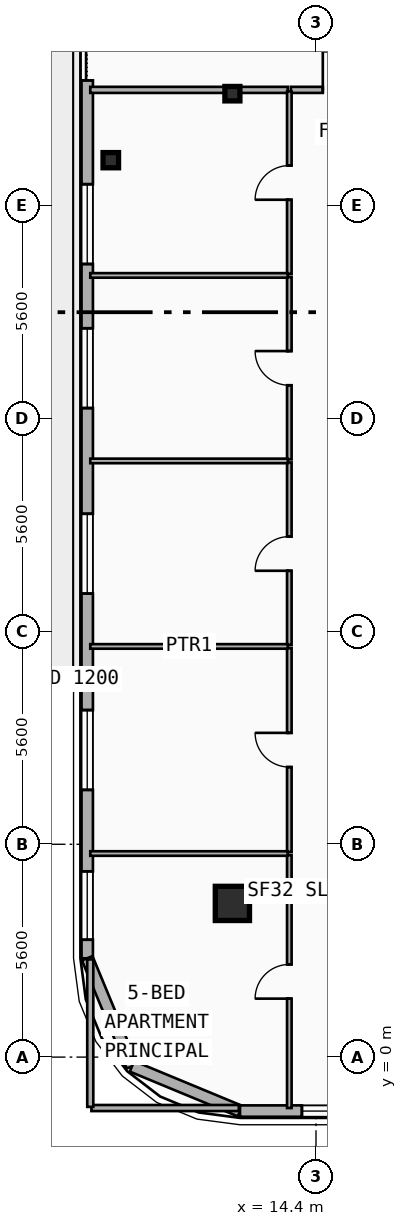
"""IFC4 building model, lengths in metres.
Left out: names, types, materials, properties, quantities, classifications, styles, units other than length and angle.
Written with IfcOpenShell. Run it as: python <this file> out.ifc"""

import sys

from ifc_helpers import new_model, si_unit, direction, frame, frame_2d, origin, origin_2d, place, context, subcontext, project, spatial, rectangle, i_section, extrude, element, fill, save


model = new_model("IFC4")
c1 = context("Model", 3, precision=1e-05, world=origin(), true_north=direction((0.0, 1.0)))
c2 = subcontext(c1, "Body", "Model", "MODEL_VIEW")
j1 = project(units=[si_unit("LENGTHUNIT", "METRE"), si_unit("PLANEANGLEUNIT", "RADIAN")], contexts=[c1])
p1 = place(None, origin())
s1 = spatial("IfcSite", under=j1, at=p1, CompositionType="ELEMENT")
p2 = place(p1, origin())
s2 = spatial("IfcBuilding", under=s1, at=p2, CompositionType="ELEMENT")
p3 = place(p2, frame((0.0, 0.0, 243.6)))
s3 = spatial("IfcBuildingStorey", under=s2, at=p3, CompositionType="ELEMENT", Elevation=243.6)
p4 = place(p3, frame((12.2, 25.35, 0.0), z_axis=(0.0, 0.0, 1.0), x_axis=(1.0, 0.0, 0.0)))
e1 = element("IfcColumn", 1, at=p4, inside=s3, PredefinedType="COLUMN", context=c2, shape_type="SweptSolid", body=[
    extrude(i_section(OverallWidth=0.395, OverallDepth=0.38, WebThickness=0.019, FlangeThickness=0.03, FilletRadius=0.015, at=origin_2d()), origin(), (0.0, 0.0, 1.0), 3.7),
])
p5 = place(p3, frame((12.2, 4.153, 0.0), z_axis=(0.0, -0.090227632116, 0.995921168769), x_axis=(1.0, 0.0, 0.0)))
e2 = element("IfcColumn", 2, at=p5, inside=s3, PredefinedType="COLUMN", context=c2, shape_type="SweptSolid", body=[
    extrude(rectangle(XDim=0.9, YDim=0.9, at=origin_2d()), origin(), (0.0, 0.0, 1.0), 3.715),
])
p6 = place(p3, frame((9.0, 23.6, 0.0), z_axis=(0.0, 0.0, 1.0), x_axis=(1.0, 0.0, 0.0)))
e3 = element("IfcColumn", 3, at=p6, inside=s3, PredefinedType="COLUMN", context=c2, shape_type="SweptSolid", body=[
    extrude(i_section(OverallWidth=0.408, OverallDepth=0.4, WebThickness=0.025, FlangeThickness=0.039, FilletRadius=0.015, at=origin_2d()), origin(), (0.0, 0.0, 1.0), 3.7),
])
p7 = place(p3, frame((8.38, 2.6, 0.0), z_axis=(0.0, 0.0, 1.0), x_axis=(0.0, 1.0, 0.0)))
e4 = element("IfcWall", 4, at=p7, inside=s3, PredefinedType="SOLIDWALL", context=c2, shape_type="SweptSolid", body=[
    extrude(rectangle(XDim=34.2, YDim=0.3, at=frame_2d((17.1, 0.0))), origin(), (0.0, 0.0, 1.0), 3.42),
])
p8 = place(p7, frame((23.1, 0.0, 0.0)))
e5 = element("IfcOpeningElement", 5, at=p8, cuts=e4, PredefinedType="OPENING", context=c2, shape_type="SweptSolid", body=[
    extrude(rectangle(XDim=1.6, YDim=2.2, at=frame_2d((0.8, 1.1))), frame((0.0, 0.16, 0.0), z_axis=(0.0, -1.0, 0.0), x_axis=(1.0, 0.0, 0.0)), (0.0, 0.0, 1.0), 0.32),
])
p9 = place(p7, frame((0.489, 0.0, 0.8)))
e6 = element("IfcOpeningElement", 6, at=p9, cuts=e4, PredefinedType="OPENING", context=c2, shape_type="SweptSolid", body=[
    extrude(rectangle(XDim=1.8, YDim=1.8, at=frame_2d((0.9, 0.9))), frame((0.0, 0.16, 0.0), z_axis=(0.0, -1.0, 0.0), x_axis=(1.0, 0.0, 0.0)), (0.0, 0.0, 1.0), 0.32),
])
p10 = place(p7, frame((4.431, 0.0, 0.75)))
e7 = element("IfcOpeningElement", 7, at=p10, cuts=e4, PredefinedType="OPENING", context=c2, shape_type="SweptSolid", body=[
    extrude(rectangle(XDim=2.1, YDim=2.1, at=frame_2d((1.05, 1.05))), frame((0.0, 0.16, 0.0), z_axis=(0.0, -1.0, 0.0), x_axis=(1.0, 0.0, 0.0)), (0.0, 0.0, 1.0), 0.32),
])
p11 = place(p7, frame((9.596, 0.0, 0.75)))
e8 = element("IfcOpeningElement", 8, at=p11, cuts=e4, PredefinedType="OPENING", context=c2, shape_type="SweptSolid", body=[
    extrude(rectangle(XDim=2.1, YDim=2.1, at=frame_2d((1.05, 1.05))), frame((0.0, 0.16, 0.0), z_axis=(0.0, -1.0, 0.0), x_axis=(1.0, 0.0, 0.0)), (0.0, 0.0, 1.0), 0.32),
])
p12 = place(p7, frame((14.478, 0.0, 0.75)))
e9 = element("IfcOpeningElement", 9, at=p12, cuts=e4, PredefinedType="OPENING", context=c2, shape_type="SweptSolid", body=[
    extrude(rectangle(XDim=2.1, YDim=2.1, at=frame_2d((1.05, 1.05))), frame((0.0, 0.16, 0.0), z_axis=(0.0, -1.0, 0.0), x_axis=(1.0, 0.0, 0.0)), (0.0, 0.0, 1.0), 0.32),
])
p13 = place(p7, frame((18.268, 0.0, 0.75)))
e10 = element("IfcOpeningElement", 10, at=p13, cuts=e4, PredefinedType="OPENING", context=c2, shape_type="SweptSolid", body=[
    extrude(rectangle(XDim=2.1, YDim=2.1, at=frame_2d((1.05, 1.05))), frame((0.0, 0.16, 0.0), z_axis=(0.0, -1.0, 0.0), x_axis=(1.0, 0.0, 0.0)), (0.0, 0.0, 1.0), 0.32),
])
p14 = place(p3, frame((9.557, -0.243, 0.0), z_axis=(0.0, 0.0, 1.0), x_axis=(-0.382676475685, 0.923882414032, 0.0)))
e11 = element("IfcWall", 11, at=p14, inside=s3, PredefinedType="SOLIDWALL", context=c2, shape_type="SweptSolid", body=[
    extrude(rectangle(XDim=3.077, YDim=0.3, at=frame_2d((1.539, 0.0))), origin(), (0.0, 0.0, 1.0), 3.42),
])
p15 = place(p3, frame((12.4, -1.42, 0.0), z_axis=(0.0, 0.0, 1.0), x_axis=(-0.92389884758, 0.382636798336, 0.0)))
e12 = element("IfcWall", 12, at=p15, inside=s3, PredefinedType="SOLIDWALL", context=c2, shape_type="SweptSolid", body=[
    extrude(rectangle(XDim=3.077, YDim=0.3, at=frame_2d((1.538, 0.0))), origin(), (0.0, 0.0, 1.0), 3.42),
])
p16 = place(p3, frame((45.2, -1.42, 0.0), z_axis=(0.0, 0.0, 1.0), x_axis=(-1.0, 0.0, 0.0)))
e13 = element("IfcWall", 13, at=p16, inside=s3, PredefinedType="SOLIDWALL", context=c2, shape_type="SweptSolid", body=[
    extrude(rectangle(XDim=32.8, YDim=0.3, at=frame_2d((16.4, 0.0))), origin(), (0.0, 0.0, 1.0), 3.42),
])
p17 = place(p16, frame((29.071, 0.0, 0.75)))
e14 = element("IfcOpeningElement", 14, at=p17, cuts=e13, PredefinedType="OPENING", context=c2, shape_type="SweptSolid", body=[
    extrude(rectangle(XDim=2.1, YDim=2.1, at=frame_2d((1.05, 1.05))), frame((0.0, 0.16, 0.0), z_axis=(0.0, -1.0, 0.0), x_axis=(1.0, 0.0, 0.0)), (0.0, 0.0, 1.0), 0.32),
])
p18 = place(p16, frame((26.745, 0.0, 0.75)))
e15 = element("IfcOpeningElement", 15, at=p18, cuts=e13, PredefinedType="OPENING", context=c2, shape_type="SweptSolid", body=[
    extrude(rectangle(XDim=1.6, YDim=1.95, at=frame_2d((0.8, 0.975))), frame((0.0, 0.16, 0.0), z_axis=(0.0, -1.0, 0.0), x_axis=(1.0, 0.0, 0.0)), (0.0, 0.0, 1.0), 0.32),
])
p19 = place(p16, frame((18.105, 0.0, 0.75)))
e16 = element("IfcOpeningElement", 16, at=p19, cuts=e13, PredefinedType="OPENING", context=c2, shape_type="SweptSolid", body=[
    extrude(rectangle(XDim=2.1, YDim=2.1, at=frame_2d((1.05, 1.05))), frame((0.0, 0.16, 0.0), z_axis=(0.0, -1.0, 0.0), x_axis=(1.0, 0.0, 0.0)), (0.0, 0.0, 1.0), 0.32),
])
p20 = place(p16, frame((21.762, 0.0, 0.75)))
e17 = element("IfcOpeningElement", 17, at=p20, cuts=e13, PredefinedType="OPENING", context=c2, shape_type="SweptSolid", body=[
    extrude(rectangle(XDim=2.1, YDim=2.1, at=frame_2d((1.05, 1.05))), frame((0.0, 0.16, 0.0), z_axis=(0.0, -1.0, 0.0), x_axis=(1.0, 0.0, 0.0)), (0.0, 0.0, 1.0), 0.32),
])
p21 = place(p16, frame((11.364, 0.0, 0.75)))
e18 = element("IfcOpeningElement", 18, at=p21, cuts=e13, PredefinedType="OPENING", context=c2, shape_type="SweptSolid", body=[
    extrude(rectangle(XDim=2.1, YDim=2.1, at=frame_2d((1.05, 1.05))), frame((0.0, 0.16, 0.0), z_axis=(0.0, -1.0, 0.0), x_axis=(1.0, 0.0, 0.0)), (0.0, 0.0, 1.0), 0.32),
])
p22 = place(p16, frame((9.238, 0.0, 0.68)))
e19 = element("IfcOpeningElement", 19, at=p22, cuts=e13, PredefinedType="OPENING", context=c2, shape_type="SweptSolid", body=[
    extrude(rectangle(XDim=1.2, YDim=1.5, at=frame_2d((0.6, 0.75))), frame((0.0, 0.16, 0.0), z_axis=(0.0, -1.0, 0.0), x_axis=(1.0, 0.0, 0.0)), (0.0, 0.0, 1.0), 0.32),
])
p23 = place(p16, frame((14.669, 0.0, 0.75)))
e20 = element("IfcOpeningElement", 20, at=p23, cuts=e13, PredefinedType="OPENING", context=c2, shape_type="SweptSolid", body=[
    extrude(rectangle(XDim=2.1, YDim=2.1, at=frame_2d((1.05, 1.05))), frame((0.0, 0.16, 0.0), z_axis=(0.0, -1.0, 0.0), x_axis=(1.0, 0.0, 0.0)), (0.0, 0.0, 1.0), 0.32),
])
p24 = place(p16, frame((1.937, 0.0, 0.75)))
e21 = element("IfcOpeningElement", 21, at=p24, cuts=e13, PredefinedType="OPENING", context=c2, shape_type="SweptSolid", body=[
    extrude(rectangle(XDim=2.1, YDim=2.1, at=frame_2d((1.05, 1.05))), frame((0.0, 0.16, 0.0), z_axis=(0.0, -1.0, 0.0), x_axis=(1.0, 0.0, 0.0)), (0.0, 0.0, 1.0), 0.32),
])
p25 = place(p16, frame((4.709, 0.0, 0.8)))
e22 = element("IfcOpeningElement", 22, at=p25, cuts=e13, PredefinedType="OPENING", context=c2, shape_type="SweptSolid", body=[
    extrude(rectangle(XDim=1.8, YDim=1.8, at=frame_2d((0.9, 0.9))), frame((0.0, 0.16, 0.0), z_axis=(0.0, -1.0, 0.0), x_axis=(1.0, 0.0, 0.0)), (0.0, 0.0, 1.0), 0.32),
])
p26 = place(p3, frame((13.738, 25.45, 0.0), z_axis=(0.0, 0.0, 1.0), x_axis=(1.0, 0.0, 0.0)))
e23 = element("IfcWall", 23, at=p26, inside=s3, PredefinedType="PARTITIONING", context=c2, shape_type="SweptSolid", body=[
    extrude(rectangle(XDim=2.682, YDim=0.16, at=frame_2d((1.341, 0.0))), origin(), (0.0, 0.0, 1.0), 3.42),
])
p27 = place(p26, frame((0.841, 0.0, 0.0)))
e24 = element("IfcOpeningElement", 24, at=p27, cuts=e23, PredefinedType="OPENING", context=c2, shape_type="SweptSolid", body=[
    extrude(rectangle(XDim=1.0, YDim=2.15, at=frame_2d((0.5, 1.075))), frame((0.0, 0.09, 0.0), z_axis=(0.0, -1.0, 0.0), x_axis=(1.0, 0.0, 0.0)), (0.0, 0.0, 1.0), 0.18),
])
p28 = place(p3, frame((8.46, 25.45, 0.0), z_axis=(0.0, 0.0, 1.0), x_axis=(1.0, 0.0, 0.0)))
e25 = element("IfcWall", 25, at=p28, inside=s3, PredefinedType="PARTITIONING", context=c2, shape_type="SweptSolid", body=[
    extrude(rectangle(XDim=5.198, YDim=0.16, at=frame_2d((2.599, 0.0))), origin(), (0.0, 0.0, 1.0), 2.7),
])
p29 = place(p3, frame((13.698, -1.34, 0.0), z_axis=(0.0, 0.0, 1.0), x_axis=(0.0, 1.0, 0.0)))
e26 = element("IfcWall", 26, at=p29, inside=s3, PredefinedType="PARTITIONING", context=c2, shape_type="SweptSolid", body=[
    extrude(rectangle(XDim=6.657, YDim=0.12, at=frame_2d((3.329, 0.0))), origin(), (0.0, 0.0, 1.0), 3.08),
])
p30 = place(p29, frame((2.878, 0.0, 0.0)))
e27 = element("IfcOpeningElement", 27, at=p30, cuts=e26, PredefinedType="OPENING", context=c2, shape_type="SweptSolid", body=[
    extrude(rectangle(XDim=0.9, YDim=2.1, at=frame_2d((0.45, 1.05))), frame((0.0, 0.07, 0.0), z_axis=(0.0, -1.0, 0.0), x_axis=(1.0, 0.0, 0.0)), (0.0, 0.0, 1.0), 0.14),
])
p31 = place(p3, frame((13.698, 5.397, 0.0), z_axis=(0.0, 0.0, 1.0), x_axis=(0.0, 1.0, 0.0)))
e28 = element("IfcWall", 28, at=p31, inside=s3, PredefinedType="PARTITIONING", context=c2, shape_type="SweptSolid", body=[
    extrude(rectangle(XDim=5.369, YDim=0.12, at=frame_2d((2.685, 0.0))), origin(), (0.0, 0.0, 1.0), 3.05),
])
p32 = place(p31, frame((2.235, 0.0, 0.0)))
e29 = element("IfcOpeningElement", 29, at=p32, cuts=e28, PredefinedType="OPENING", context=c2, shape_type="SweptSolid", body=[
    extrude(rectangle(XDim=0.9, YDim=2.1, at=frame_2d((0.45, 1.05))), frame((0.0, 0.07, 0.0), z_axis=(0.0, -1.0, 0.0), x_axis=(1.0, 0.0, 0.0)), (0.0, 0.0, 1.0), 0.14),
])
p33 = place(p3, frame((13.698, 10.846, 0.0), z_axis=(0.0, 0.0, 1.0), x_axis=(0.0, 1.0, 0.0)))
e30 = element("IfcWall", 30, at=p33, inside=s3, PredefinedType="PARTITIONING", context=c2, shape_type="SweptSolid", body=[
    extrude(rectangle(XDim=4.801, YDim=0.12, at=frame_2d((2.4, 0.0))), origin(), (0.0, 0.0, 1.0), 2.9),
])
p34 = place(p33, frame((1.95, 0.0, 0.0)))
e31 = element("IfcOpeningElement", 31, at=p34, cuts=e30, PredefinedType="OPENING", context=c2, shape_type="SweptSolid", body=[
    extrude(rectangle(XDim=0.9, YDim=2.1, at=frame_2d((0.45, 1.05))), frame((0.0, 0.07, 0.0), z_axis=(0.0, -1.0, 0.0), x_axis=(1.0, 0.0, 0.0)), (0.0, 0.0, 1.0), 0.14),
])
p35 = place(p3, frame((13.698, 15.727, 0.0), z_axis=(0.0, 0.0, 1.0), x_axis=(0.0, 1.0, 0.0)))
e32 = element("IfcWall", 32, at=p35, inside=s3, PredefinedType="PARTITIONING", context=c2, shape_type="SweptSolid", body=[
    extrude(rectangle(XDim=4.801, YDim=0.12, at=frame_2d((2.4, 0.0))), origin(), (0.0, 0.0, 1.0), 2.9),
])
p36 = place(p35, frame((1.95, 0.0, 0.0)))
e33 = element("IfcOpeningElement", 33, at=p36, cuts=e32, PredefinedType="OPENING", context=c2, shape_type="SweptSolid", body=[
    extrude(rectangle(XDim=0.9, YDim=2.1, at=frame_2d((0.45, 1.05))), frame((0.0, 0.07, 0.0), z_axis=(0.0, -1.0, 0.0), x_axis=(1.0, 0.0, 0.0)), (0.0, 0.0, 1.0), 0.14),
])
p37 = place(p3, frame((13.698, 20.608, 0.0), z_axis=(0.0, 0.0, 1.0), x_axis=(0.0, 1.0, 0.0)))
e34 = element("IfcWall", 34, at=p37, inside=s3, PredefinedType="PARTITIONING", context=c2, shape_type="SweptSolid", body=[
    extrude(rectangle(XDim=4.802, YDim=0.12, at=frame_2d((2.401, 0.0))), origin(), (0.0, 0.0, 1.0), 3.05),
])
p38 = place(p37, frame((1.951, 0.0, 0.0)))
e35 = element("IfcOpeningElement", 35, at=p38, cuts=e34, PredefinedType="OPENING", context=c2, shape_type="SweptSolid", body=[
    extrude(rectangle(XDim=0.9, YDim=2.1, at=frame_2d((0.45, 1.05))), frame((0.0, 0.07, 0.0), z_axis=(0.0, -1.0, 0.0), x_axis=(1.0, 0.0, 0.0)), (0.0, 0.0, 1.0), 0.14),
])
for number, where, z_axis, x_axis in (
    (36, (8.46, 5.357, 0.0), (0.0, 0.0, 1.0), (1.0, 0.0, 0.0)),
    (37, (8.46, 10.806, 0.0), (0.0, 0.0, 1.0), (1.0, 0.0, 0.0)),
    (38, (8.46, 15.687, 0.0), (0.0, 0.0, 1.0), (1.0, 0.0, 0.0)),
    (39, (8.46, 20.568, 0.0), (0.0, 0.0, 1.0), (1.0, 0.0, 0.0)),
):
    element("IfcWall", number, at=place(p3, frame(where, z_axis=z_axis, x_axis=x_axis)), inside=s3, PredefinedType="PARTITIONING", context=c2, shape_type="SweptSolid", body=[
        extrude(rectangle(XDim=5.198, YDim=0.12, at=frame_2d((2.599, 0.0))), origin(), (0.0, 0.0, 1.0), 2.7),
    ])
for number, where, z_axis, x_axis in (
    (40, (8.49, -1.34, 0.0), (0.0, 0.0, 1.0), (1.0, 0.0, 0.0)),
    (41, (8.46, -1.31, 0.0), (0.0, 0.0, 1.0), (0.0, 1.0, 0.0)),
):
    element("IfcWall", number, at=place(p3, frame(where, z_axis=z_axis, x_axis=x_axis)), inside=s3, PredefinedType="PARTITIONING", context=c2, shape_type="SweptSolid", body=[
        extrude(rectangle(XDim=3.88, YDim=0.16, at=frame_2d((1.94, 0.0))), origin(), (0.0, 0.0, 1.0), 3.42),
    ])
p39 = place(p8, origin())
e42 = element("IfcDoor", 42, at=p39, inside=s3, OperationType="DOUBLE_DOOR_SLIDING", PredefinedType="DOOR", context=c2, shape_type="SweptSolid", body=[
    extrude(rectangle(XDim=1.6, YDim=2.2, at=frame_2d((0.8, 1.1))), frame((0.0, 0.025, 0.0), z_axis=(0.0, -1.0, 0.0), x_axis=(1.0, 0.0, 0.0)), (0.0, 0.0, 1.0), 0.05),
])
fill(e5, e42)
p40 = place(p9, origin())
e43 = element("IfcWindow", 43, at=p40, inside=s3, PartitioningType="SINGLE_PANEL", PredefinedType="WINDOW", context=c2, shape_type="SweptSolid", body=[
    extrude(rectangle(XDim=1.8, YDim=1.8, at=frame_2d((0.9, 0.9))), frame((0.0, 0.03, 0.0), z_axis=(0.0, -1.0, 0.0), x_axis=(1.0, 0.0, 0.0)), (0.0, 0.0, 1.0), 0.06),
])
fill(e6, e43)
p41 = place(p10, origin())
e44 = element("IfcWindow", 44, at=p41, inside=s3, PartitioningType="SINGLE_PANEL", PredefinedType="WINDOW", context=c2, shape_type="SweptSolid", body=[
    extrude(rectangle(XDim=2.1, YDim=2.1, at=frame_2d((1.05, 1.05))), frame((0.0, 0.03, 0.0), z_axis=(0.0, -1.0, 0.0), x_axis=(1.0, 0.0, 0.0)), (0.0, 0.0, 1.0), 0.06),
])
fill(e7, e44)
p42 = place(p11, origin())
e45 = element("IfcWindow", 45, at=p42, inside=s3, PartitioningType="SINGLE_PANEL", PredefinedType="WINDOW", context=c2, shape_type="SweptSolid", body=[
    extrude(rectangle(XDim=2.1, YDim=2.1, at=frame_2d((1.05, 1.05))), frame((0.0, 0.03, 0.0), z_axis=(0.0, -1.0, 0.0), x_axis=(1.0, 0.0, 0.0)), (0.0, 0.0, 1.0), 0.06),
])
fill(e8, e45)
p43 = place(p12, origin())
e46 = element("IfcWindow", 46, at=p43, inside=s3, PartitioningType="SINGLE_PANEL", PredefinedType="WINDOW", context=c2, shape_type="SweptSolid", body=[
    extrude(rectangle(XDim=2.1, YDim=2.1, at=frame_2d((1.05, 1.05))), frame((0.0, 0.03, 0.0), z_axis=(0.0, -1.0, 0.0), x_axis=(1.0, 0.0, 0.0)), (0.0, 0.0, 1.0), 0.06),
])
fill(e9, e46)
p44 = place(p13, origin())
e47 = element("IfcWindow", 47, at=p44, inside=s3, PartitioningType="SINGLE_PANEL", PredefinedType="WINDOW", context=c2, shape_type="SweptSolid", body=[
    extrude(rectangle(XDim=2.1, YDim=2.1, at=frame_2d((1.05, 1.05))), frame((0.0, 0.03, 0.0), z_axis=(0.0, -1.0, 0.0), x_axis=(1.0, 0.0, 0.0)), (0.0, 0.0, 1.0), 0.06),
])
fill(e10, e47)
p45 = place(p17, origin())
e48 = element("IfcWindow", 48, at=p45, inside=s3, PartitioningType="SINGLE_PANEL", PredefinedType="WINDOW", context=c2, shape_type="SweptSolid", body=[
    extrude(rectangle(XDim=2.1, YDim=2.1, at=frame_2d((1.05, 1.05))), frame((0.0, 0.03, 0.0), z_axis=(0.0, -1.0, 0.0), x_axis=(1.0, 0.0, 0.0)), (0.0, 0.0, 1.0), 0.06),
])
fill(e14, e48)
p46 = place(p27, origin())
e49 = element("IfcDoor", 49, at=p46, inside=s3, OperationType="SINGLE_SWING_LEFT", PredefinedType="DOOR", context=c2, shape_type="SweptSolid", body=[
    extrude(rectangle(XDim=1.0, YDim=2.15, at=frame_2d((0.5, 1.075))), frame((0.0, 0.025, 0.0), z_axis=(0.0, -1.0, 0.0), x_axis=(1.0, 0.0, 0.0)), (0.0, 0.0, 1.0), 0.05),
])
fill(e24, e49)
p47 = place(p30, origin())
e50 = element("IfcDoor", 50, at=p47, inside=s3, OperationType="SINGLE_SWING_LEFT", PredefinedType="DOOR", context=c2, shape_type="SweptSolid", body=[
    extrude(rectangle(XDim=0.9, YDim=2.1, at=frame_2d((0.45, 1.05))), frame((0.0, 0.025, 0.0), z_axis=(0.0, -1.0, 0.0), x_axis=(1.0, 0.0, 0.0)), (0.0, 0.0, 1.0), 0.05),
])
fill(e27, e50)
p48 = place(p32, origin())
e51 = element("IfcDoor", 51, at=p48, inside=s3, OperationType="SINGLE_SWING_RIGHT", PredefinedType="DOOR", context=c2, shape_type="SweptSolid", body=[
    extrude(rectangle(XDim=0.9, YDim=2.1, at=frame_2d((0.45, 1.05))), frame((0.0, 0.025, 0.0), z_axis=(0.0, -1.0, 0.0), x_axis=(1.0, 0.0, 0.0)), (0.0, 0.0, 1.0), 0.05),
])
fill(e29, e51)
p49 = place(p34, origin())
e52 = element("IfcDoor", 52, at=p49, inside=s3, OperationType="SINGLE_SWING_LEFT", PredefinedType="DOOR", context=c2, shape_type="SweptSolid", body=[
    extrude(rectangle(XDim=0.9, YDim=2.1, at=frame_2d((0.45, 1.05))), frame((0.0, 0.025, 0.0), z_axis=(0.0, -1.0, 0.0), x_axis=(1.0, 0.0, 0.0)), (0.0, 0.0, 1.0), 0.05),
])
fill(e31, e52)
p50 = place(p36, origin())
e53 = element("IfcDoor", 53, at=p50, inside=s3, OperationType="SINGLE_SWING_RIGHT", PredefinedType="DOOR", context=c2, shape_type="SweptSolid", body=[
    extrude(rectangle(XDim=0.9, YDim=2.1, at=frame_2d((0.45, 1.05))), frame((0.0, 0.025, 0.0), z_axis=(0.0, -1.0, 0.0), x_axis=(1.0, 0.0, 0.0)), (0.0, 0.0, 1.0), 0.05),
])
fill(e33, e53)
p51 = place(p38, origin())
e54 = element("IfcDoor", 54, at=p51, inside=s3, OperationType="SINGLE_SWING_LEFT", PredefinedType="DOOR", context=c2, shape_type="SweptSolid", body=[
    extrude(rectangle(XDim=0.9, YDim=2.1, at=frame_2d((0.45, 1.05))), frame((0.0, 0.025, 0.0), z_axis=(0.0, -1.0, 0.0), x_axis=(1.0, 0.0, 0.0)), (0.0, 0.0, 1.0), 0.05),
])
fill(e35, e54)
save(model, sys.argv[1])
